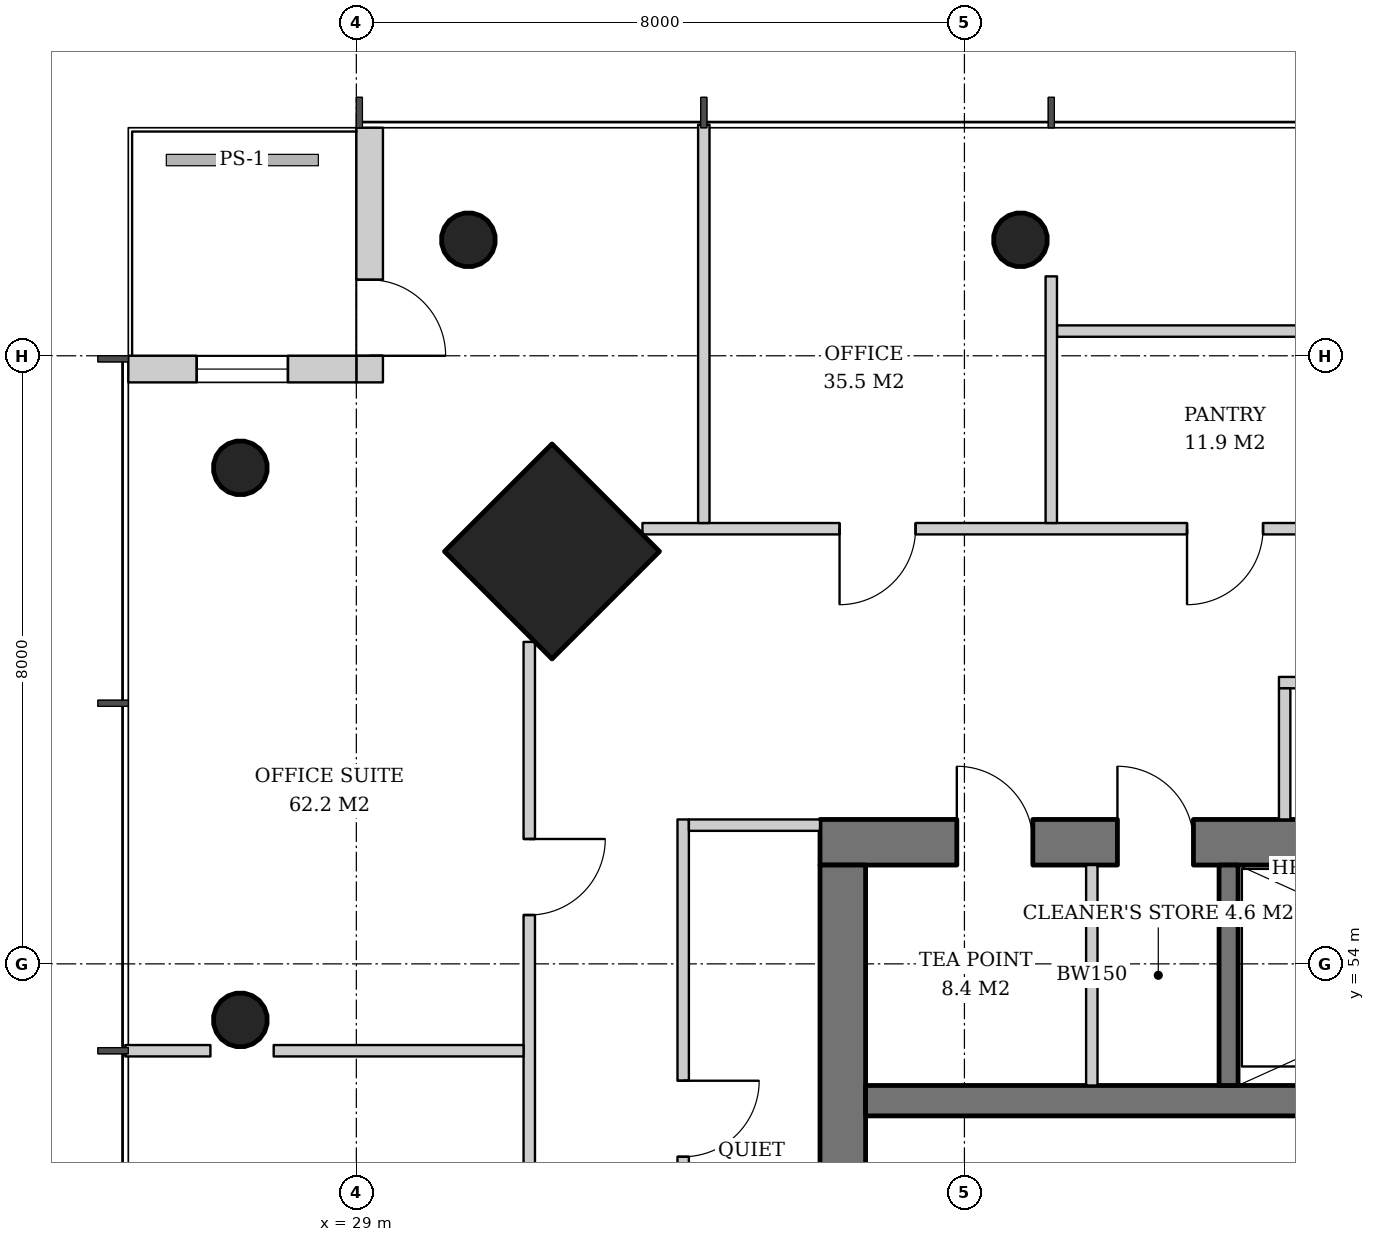
"""IFC4 building model, lengths in metres.
Left out: names, types, materials, properties, quantities, classifications, styles, units other than length and angle.
Written with IfcOpenShell. Run it as: python <this file> out.ifc"""

import sys

from ifc_helpers import new_model, si_unit, direction, frame, frame_2d, origin, origin_2d, place, context, subcontext, project, spatial, rectangle, hollow_circle, extrude, element, fill, save


model = new_model("IFC4")
c1 = context("Model", 3, precision=1e-05, world=origin(), true_north=direction((0.0, 1.0)))
c2 = subcontext(c1, "Body", "Model", "MODEL_VIEW")
j1 = project(units=[si_unit("LENGTHUNIT", "METRE"), si_unit("PLANEANGLEUNIT", "RADIAN")], contexts=[c1])
p1 = place(None, origin())
s1 = spatial("IfcSite", under=j1, at=p1, CompositionType="ELEMENT")
p2 = place(p1, origin())
s2 = spatial("IfcBuilding", under=s1, at=p2, CompositionType="ELEMENT")
p3 = place(p2, frame((0.0, 0.0, 222.4)))
s3 = spatial("IfcBuildingStorey", under=s2, at=p3, CompositionType="ELEMENT", Elevation=222.4)
p4 = place(p3, frame((31.536, 59.464, 0.0), z_axis=(0.031962158256, -0.031962158256, 0.998977898093), x_axis=(0.707106781187, 0.707106781187, 0.0)))
e1 = element("IfcColumn", 1, at=p4, inside=s3, PredefinedType="COLUMN", context=c2, shape_type="SweptSolid", body=[
    extrude(rectangle(XDim=2.0, YDim=2.0, at=origin_2d()), origin(), (0.0, 0.0, 1.0), 3.804),
])
p5 = place(p3, frame((30.436, 63.564, 0.0), z_axis=(0.031898107953, -0.031898107953, 0.998981992539), x_axis=(0.707106781187, 0.707106781187, 0.0)))
e2 = element("IfcColumn", 2, at=p5, inside=s3, PredefinedType="COLUMN", context=c2, shape_type="SweptSolid", body=[
    extrude(hollow_circle(Radius=0.355, WallThickness=0.025, at=origin_2d()), origin(), (0.0, 0.0, 1.0), 3.804),
])
p6 = place(p3, frame((37.718, 63.564, 0.0), z_axis=(0.015987237665, -0.031910269556, 0.999362868496), x_axis=(0.894067115991, 0.447933021895, 0.0)))
e3 = element("IfcColumn", 3, at=p6, inside=s3, PredefinedType="COLUMN", context=c2, shape_type="SweptSolid", body=[
    extrude(hollow_circle(Radius=0.355, WallThickness=0.025, at=origin_2d()), origin(), (0.0, 0.0, 1.0), 3.802),
])
p7 = place(p3, frame((27.436, 60.564, 0.0), z_axis=(0.031898107953, -0.031898107953, 0.998981992539), x_axis=(0.707106781187, 0.707106781187, 0.0)))
e4 = element("IfcColumn", 4, at=p7, inside=s3, PredefinedType="COLUMN", context=c2, shape_type="SweptSolid", body=[
    extrude(hollow_circle(Radius=0.355, WallThickness=0.025, at=origin_2d()), origin(), (0.0, 0.0, 1.0), 3.804),
])
p8 = place(p3, frame((27.436, 53.282, 0.0), z_axis=(0.031910269556, -0.015987237665, 0.999362868496), x_axis=(0.447933021895, 0.894067115991, 0.0)))
e5 = element("IfcColumn", 5, at=p8, inside=s3, PredefinedType="COLUMN", context=c2, shape_type="SweptSolid", body=[
    extrude(hollow_circle(Radius=0.355, WallThickness=0.025, at=origin_2d()), origin(), (0.0, 0.0, 1.0), 3.802),
])
p9 = place(p3, frame((35.1, 55.6, 0.0), z_axis=(0.0, 0.0, 1.0), x_axis=(1.0, 0.0, 0.0)))
e6 = element("IfcWall", 6, at=p9, inside=s3, PredefinedType="SHEAR", context=c2, shape_type="SweptSolid", body=[
    extrude(rectangle(XDim=19.8, YDim=0.6, at=frame_2d((9.9, 0.0))), origin(), (0.0, 0.0, 1.0), 3.8),
])
p10 = place(p9, frame((14.54, 0.0, 0.0)))
e7 = element("IfcOpeningElement", 7, at=p10, cuts=e6, PredefinedType="OPENING", context=c2, shape_type="SweptSolid", body=[
    extrude(rectangle(XDim=1.0, YDim=2.1, at=frame_2d((0.5, 1.05))), frame((0.0, 0.31, 0.0), z_axis=(0.0, -1.0, 0.0), x_axis=(1.0, 0.0, 0.0)), (0.0, 0.0, 1.0), 0.62),
])
p11 = place(p9, frame((1.8, 0.0, 0.0)))
e8 = element("IfcOpeningElement", 8, at=p11, cuts=e6, PredefinedType="OPENING", context=c2, shape_type="SweptSolid", body=[
    extrude(rectangle(XDim=1.0, YDim=2.1, at=frame_2d((0.5, 1.05))), frame((0.0, 0.31, 0.0), z_axis=(0.0, -1.0, 0.0), x_axis=(1.0, 0.0, 0.0)), (0.0, 0.0, 1.0), 0.62),
])
p12 = place(p9, frame((3.913, 0.0, 0.0)))
e9 = element("IfcOpeningElement", 9, at=p12, cuts=e6, PredefinedType="OPENING", context=c2, shape_type="SweptSolid", body=[
    extrude(rectangle(XDim=1.0, YDim=2.1, at=frame_2d((0.5, 1.05))), frame((0.0, 0.31, 0.0), z_axis=(0.0, -1.0, 0.0), x_axis=(1.0, 0.0, 0.0)), (0.0, 0.0, 1.0), 0.62),
])
p13 = place(p3, frame((35.4, 36.7, 0.0), z_axis=(0.0, 0.0, 1.0), x_axis=(0.0, 1.0, 0.0)))
e10 = element("IfcWall", 10, at=p13, inside=s3, PredefinedType="SHEAR", context=c2, shape_type="SweptSolid", body=[
    extrude(rectangle(XDim=18.6, YDim=0.6, at=frame_2d((9.3, 0.0))), origin(), (0.0, 0.0, 1.0), 3.8),
])
p14 = place(p13, frame((8.4, 0.0, 0.0)))
e11 = element("IfcOpeningElement", 11, at=p14, cuts=e10, PredefinedType="OPENING", context=c2, shape_type="SweptSolid", body=[
    extrude(rectangle(XDim=1.8, YDim=2.4, at=frame_2d((0.9, 1.2))), frame((0.0, 0.31, 0.0), z_axis=(0.0, -1.0, 0.0), x_axis=(1.0, 0.0, 0.0)), (0.0, 0.0, 1.0), 0.62),
])
p15 = place(p3, frame((35.7, 52.2, 0.0), z_axis=(0.0, 0.0, 1.0), x_axis=(1.0, 0.0, 0.0)))
e12 = element("IfcWall", 12, at=p15, inside=s3, PredefinedType="SHEAR", context=c2, shape_type="SweptSolid", body=[
    extrude(rectangle(XDim=18.6, YDim=0.4, at=frame_2d((9.3, 0.0))), origin(), (0.0, 0.0, 1.0), 3.8),
])
p16 = place(p3, frame((29.175, 65.0, 0.0), z_axis=(0.0, 0.0, 1.0), x_axis=(0.0, -1.0, 0.0)))
e13 = element("IfcWall", 13, at=p16, inside=s3, PredefinedType="SOLIDWALL", context=c2, shape_type="SweptSolid", body=[
    extrude(rectangle(XDim=3.35, YDim=0.35, at=frame_2d((1.675, 0.0))), origin(), (0.0, 0.0, 1.0), 3.52),
])
p17 = place(p16, frame((2.0, 0.0, 0.0)))
e14 = element("IfcOpeningElement", 14, at=p17, cuts=e13, PredefinedType="OPENING", context=c2, shape_type="SweptSolid", body=[
    extrude(rectangle(XDim=1.0, YDim=2.4, at=frame_2d((0.5, 1.2))), frame((0.0, 0.185, 0.0), z_axis=(0.0, -1.0, 0.0), x_axis=(1.0, 0.0, 0.0)), (0.0, 0.0, 1.0), 0.37),
])
p18 = place(p3, frame((29.0, 61.825, 0.0), z_axis=(0.0, 0.0, 1.0), x_axis=(-1.0, 0.0, 0.0)))
e15 = element("IfcWall", 15, at=p18, inside=s3, PredefinedType="SOLIDWALL", context=c2, shape_type="SweptSolid", body=[
    extrude(rectangle(XDim=3.0, YDim=0.35, at=frame_2d((1.5, 0.0))), origin(), (0.0, 0.0, 1.0), 3.52),
])
p19 = place(p18, frame((0.9, 0.0, 0.6)))
e16 = element("IfcOpeningElement", 16, at=p19, cuts=e15, PredefinedType="OPENING", context=c2, shape_type="SweptSolid", body=[
    extrude(rectangle(XDim=1.2, YDim=2.55, at=frame_2d((0.6, 1.275))), frame((0.0, 0.185, 0.0), z_axis=(0.0, -1.0, 0.0), x_axis=(1.0, 0.0, 0.0)), (0.0, 0.0, 1.0), 0.37),
])
p20 = place(p3, frame((40.475, 52.4, 0.0), z_axis=(0.0, 0.0, 1.0), x_axis=(0.0, 1.0, 0.0)))
e17 = element("IfcWall", 17, at=p20, inside=s3, PredefinedType="SHEAR", context=c2, shape_type="SweptSolid", body=[
    extrude(rectangle(XDim=2.9, YDim=0.25, at=frame_2d((1.45, 0.0))), origin(), (0.0, 0.0, 1.0), 3.8),
])
p21 = place(p3, frame((38.676, 52.4, 0.0), z_axis=(0.0, 0.0, 1.0), x_axis=(0.0, 1.0, 0.0)))
e18 = element("IfcWall", 18, at=p21, inside=s3, PredefinedType="SOLIDWALL", context=c2, shape_type="SweptSolid", body=[
    extrude(rectangle(XDim=2.9, YDim=0.15, at=frame_2d((1.45, 0.0))), origin(), (0.0, 0.0, 1.0), 3.52),
])
p22 = place(p3, frame((48.515, 57.7, 0.0), z_axis=(0.0, 0.0, 1.0), x_axis=(-1.0, 0.0, 0.0)))
e19 = element("IfcWall", 19, at=p22, inside=s3, PredefinedType="PARTITIONING", context=c2, shape_type="SweptSolid", body=[
    extrude(rectangle(XDim=7.377, YDim=0.15, at=frame_2d((3.688, 0.0))), origin(), (0.0, 0.0, 1.0), 2.706),
])
p23 = place(p22, frame((3.188, 0.0, 0.0)))
e20 = element("IfcOpeningElement", 20, at=p23, cuts=e19, PredefinedType="OPENING", context=c2, shape_type="SweptSolid", body=[
    extrude(rectangle(XDim=1.0, YDim=2.1, at=frame_2d((0.5, 1.05))), frame((0.0, 0.085, 0.0), z_axis=(0.0, -1.0, 0.0), x_axis=(1.0, 0.0, 0.0)), (0.0, 0.0, 1.0), 0.17),
])
p24 = place(p3, frame((41.213, 55.9, 0.0), z_axis=(0.0, 0.0, 1.0), x_axis=(0.0, 1.0, 0.0)))
e21 = element("IfcWall", 21, at=p24, inside=s3, PredefinedType="PARTITIONING", context=c2, shape_type="SweptSolid", body=[
    extrude(rectangle(XDim=1.725, YDim=0.15, at=frame_2d((0.863, 0.0))), origin(), (0.0, 0.0, 1.0), 2.706),
])
p25 = place(p3, frame((33.3, 55.9, 0.0), z_axis=(0.0, 0.0, 1.0), x_axis=(0.0, -1.0, 0.0)))
e22 = element("IfcWall", 22, at=p25, inside=s3, PredefinedType="PARTITIONING", context=c2, shape_type="SweptSolid", body=[
    extrude(rectangle(XDim=7.875, YDim=0.15, at=frame_2d((3.938, 0.0))), origin(), (0.0, 0.0, 1.0), 2.706),
])
p26 = place(p25, frame((3.438, 0.0, 0.0)))
e23 = element("IfcOpeningElement", 23, at=p26, cuts=e22, PredefinedType="OPENING", context=c2, shape_type="SweptSolid", body=[
    extrude(rectangle(XDim=1.0, YDim=2.1, at=frame_2d((0.5, 1.05))), frame((0.0, 0.085, 0.0), z_axis=(0.0, -1.0, 0.0), x_axis=(1.0, 0.0, 0.0)), (0.0, 0.0, 1.0), 0.17),
])
p27 = place(p3, frame((35.1, 55.825, 0.0), z_axis=(0.0, 0.0, 1.0), x_axis=(-1.0, 0.0, 0.0)))
e24 = element("IfcWall", 24, at=p27, inside=s3, PredefinedType="PARTITIONING", context=c2, shape_type="SweptSolid", body=[
    extrude(rectangle(XDim=1.725, YDim=0.15, at=frame_2d((0.863, 0.0))), origin(), (0.0, 0.0, 1.0), 2.92),
])
p28 = place(p3, frame((42.639, 62.325, 0.0), z_axis=(0.0, 0.0, 1.0), x_axis=(-1.0, 0.0, 0.0)))
e25 = element("IfcWall", 25, at=p28, inside=s3, PredefinedType="PARTITIONING", context=c2, shape_type="SweptSolid", body=[
    extrude(rectangle(XDim=4.422, YDim=0.15, at=frame_2d((2.211, 0.0))), origin(), (0.0, 0.0, 1.0), 2.706),
])
p29 = place(p3, frame((57.236, 59.725, 0.0), z_axis=(0.0, 0.0, 1.0), x_axis=(-1.0, 0.0, 0.0)))
e26 = element("IfcWall", 26, at=p29, inside=s3, PredefinedType="PARTITIONING", context=c2, shape_type="SweptSolid", body=[
    extrude(rectangle(XDim=24.472, YDim=0.15, at=frame_2d((12.236, 0.0))), origin(), (0.0, 0.0, 1.0), 2.706),
])
p30 = place(p29, frame((2.593, 0.0, 0.0)))
e27 = element("IfcOpeningElement", 27, at=p30, cuts=e26, PredefinedType="OPENING", context=c2, shape_type="SweptSolid", body=[
    extrude(rectangle(XDim=1.0, YDim=2.1, at=frame_2d((0.5, 1.05))), frame((0.0, 0.085, 0.0), z_axis=(0.0, -1.0, 0.0), x_axis=(1.0, 0.0, 0.0)), (0.0, 0.0, 1.0), 0.17),
])
p31 = place(p29, frame((7.164, 0.0, 0.0)))
e28 = element("IfcOpeningElement", 28, at=p31, cuts=e26, PredefinedType="OPENING", context=c2, shape_type="SweptSolid", body=[
    extrude(rectangle(XDim=1.0, YDim=2.1, at=frame_2d((0.5, 1.05))), frame((0.0, 0.085, 0.0), z_axis=(0.0, -1.0, 0.0), x_axis=(1.0, 0.0, 0.0)), (0.0, 0.0, 1.0), 0.17),
])
p32 = place(p29, frame((11.736, 0.0, 0.0)))
e29 = element("IfcOpeningElement", 29, at=p32, cuts=e26, PredefinedType="OPENING", context=c2, shape_type="SweptSolid", body=[
    extrude(rectangle(XDim=1.0, YDim=2.1, at=frame_2d((0.5, 1.05))), frame((0.0, 0.085, 0.0), z_axis=(0.0, -1.0, 0.0), x_axis=(1.0, 0.0, 0.0)), (0.0, 0.0, 1.0), 0.17),
])
p33 = place(p29, frame((16.307, 0.0, 0.0)))
e30 = element("IfcOpeningElement", 30, at=p33, cuts=e26, PredefinedType="OPENING", context=c2, shape_type="SweptSolid", body=[
    extrude(rectangle(XDim=1.0, YDim=2.1, at=frame_2d((0.5, 1.05))), frame((0.0, 0.085, 0.0), z_axis=(0.0, -1.0, 0.0), x_axis=(1.0, 0.0, 0.0)), (0.0, 0.0, 1.0), 0.17),
])
p34 = place(p29, frame((20.879, 0.0, 0.0)))
e31 = element("IfcOpeningElement", 31, at=p34, cuts=e26, PredefinedType="OPENING", context=c2, shape_type="SweptSolid", body=[
    extrude(rectangle(XDim=1.0, YDim=2.1, at=frame_2d((0.5, 1.05))), frame((0.0, 0.085, 0.0), z_axis=(0.0, -1.0, 0.0), x_axis=(1.0, 0.0, 0.0)), (0.0, 0.0, 1.0), 0.17),
])
p35 = place(p3, frame((38.143, 59.8, 0.0), z_axis=(0.0, 0.0, 1.0), x_axis=(0.0, 1.0, 0.0)))
e32 = element("IfcWall", 32, at=p35, inside=s3, PredefinedType="PARTITIONING", context=c2, shape_type="SweptSolid", body=[
    extrude(rectangle(XDim=3.245, YDim=0.15, at=frame_2d((1.623, 0.0))), origin(), (0.0, 0.0, 1.0), 3.52),
])
p36 = place(p3, frame((33.572, 59.8, 0.0), z_axis=(0.0, 0.0, 1.0), x_axis=(0.0, 1.0, 0.0)))
e33 = element("IfcWall", 33, at=p36, inside=s3, PredefinedType="PARTITIONING", context=c2, shape_type="SweptSolid", body=[
    extrude(rectangle(XDim=5.24, YDim=0.15, at=frame_2d((2.62, 0.0))), origin(), (0.0, 0.0, 1.0), 3.52),
])
p37 = place(p3, frame((31.275, 58.236, 0.0), z_axis=(0.0, 0.0, 1.0), x_axis=(0.0, -1.0, 0.0)))
e34 = element("IfcWall", 34, at=p37, inside=s3, PredefinedType="PARTITIONING", context=c2, shape_type="SweptSolid", body=[
    extrude(rectangle(XDim=24.472, YDim=0.15, at=frame_2d((12.236, 0.0))), origin(), (0.0, 0.0, 1.0), 2.706),
])
p38 = place(p37, frame((2.593, 0.0, 0.0)))
e35 = element("IfcOpeningElement", 35, at=p38, cuts=e34, PredefinedType="OPENING", context=c2, shape_type="SweptSolid", body=[
    extrude(rectangle(XDim=1.0, YDim=2.1, at=frame_2d((0.5, 1.05))), frame((0.0, 0.085, 0.0), z_axis=(0.0, -1.0, 0.0), x_axis=(1.0, 0.0, 0.0)), (0.0, 0.0, 1.0), 0.17),
])
p39 = place(p37, frame((7.164, 0.0, 0.0)))
e36 = element("IfcOpeningElement", 36, at=p39, cuts=e34, PredefinedType="OPENING", context=c2, shape_type="SweptSolid", body=[
    extrude(rectangle(XDim=1.0, YDim=2.1, at=frame_2d((0.5, 1.05))), frame((0.0, 0.085, 0.0), z_axis=(0.0, -1.0, 0.0), x_axis=(1.0, 0.0, 0.0)), (0.0, 0.0, 1.0), 0.17),
])
p40 = place(p37, frame((11.836, 0.0, 0.0)))
e37 = element("IfcOpeningElement", 37, at=p40, cuts=e34, PredefinedType="OPENING", context=c2, shape_type="SweptSolid", body=[
    extrude(rectangle(XDim=0.8, YDim=2.1, at=frame_2d((0.4, 1.05))), frame((0.0, 0.085, 0.0), z_axis=(0.0, -1.0, 0.0), x_axis=(1.0, 0.0, 0.0)), (0.0, 0.0, 1.0), 0.17),
])
p41 = place(p37, frame((16.307, 0.0, 0.0)))
e38 = element("IfcOpeningElement", 38, at=p41, cuts=e34, PredefinedType="OPENING", context=c2, shape_type="SweptSolid", body=[
    extrude(rectangle(XDim=1.0, YDim=2.1, at=frame_2d((0.5, 1.05))), frame((0.0, 0.085, 0.0), z_axis=(0.0, -1.0, 0.0), x_axis=(1.0, 0.0, 0.0)), (0.0, 0.0, 1.0), 0.17),
])
p42 = place(p37, frame((20.979, 0.0, 0.0)))
e39 = element("IfcOpeningElement", 39, at=p42, cuts=e34, PredefinedType="OPENING", context=c2, shape_type="SweptSolid", body=[
    extrude(rectangle(XDim=0.8, YDim=2.1, at=frame_2d((0.4, 1.05))), frame((0.0, 0.085, 0.0), z_axis=(0.0, -1.0, 0.0), x_axis=(1.0, 0.0, 0.0)), (0.0, 0.0, 1.0), 0.17),
])
p43 = place(p3, frame((31.2, 52.857, 0.0), z_axis=(0.0, 0.0, 1.0), x_axis=(-1.0, 0.0, 0.0)))
e40 = element("IfcWall", 40, at=p43, inside=s3, PredefinedType="PARTITIONING", context=c2, shape_type="SweptSolid", body=[
    extrude(rectangle(XDim=3.287, YDim=0.15, at=frame_2d((1.644, 0.0))), origin(), (0.0, 0.0, 1.0), 3.52),
])
p44 = place(p3, frame((27.08, 52.857, 0.0), z_axis=(0.0, 0.0, 1.0), x_axis=(-1.0, 0.0, 0.0)))
e41 = element("IfcWall", 41, at=p44, inside=s3, PredefinedType="PARTITIONING", context=c2, shape_type="SweptSolid", body=[
    extrude(rectangle(XDim=1.12, YDim=0.15, at=frame_2d((0.56, 0.0))), origin(), (0.0, 0.0, 1.0), 3.52),
])
p45 = place(p17, origin())
e42 = element("IfcDoor", 42, at=p45, inside=s3, OperationType="SINGLE_SWING_RIGHT", PredefinedType="DOOR", context=c2, shape_type="SweptSolid", body=[
    extrude(rectangle(XDim=1.0, YDim=2.4, at=frame_2d((0.5, 1.2))), frame((0.0, 0.025, 0.0), z_axis=(0.0, -1.0, 0.0), x_axis=(1.0, 0.0, 0.0)), (0.0, 0.0, 1.0), 0.05),
])
fill(e14, e42)
p46 = place(p19, origin())
e43 = element("IfcWindow", 43, at=p46, inside=s3, PartitioningType="SINGLE_PANEL", PredefinedType="WINDOW", context=c2, shape_type="SweptSolid", body=[
    extrude(rectangle(XDim=1.2, YDim=2.55, at=frame_2d((0.6, 1.275))), frame((0.0, 0.03, 0.0), z_axis=(0.0, -1.0, 0.0), x_axis=(1.0, 0.0, 0.0)), (0.0, 0.0, 1.0), 0.06),
])
fill(e16, e43)
p47 = place(p11, origin())
e44 = element("IfcDoor", 44, at=p47, inside=s3, OperationType="SINGLE_SWING_LEFT", PredefinedType="DOOR", context=c2, shape_type="SweptSolid", body=[
    extrude(rectangle(XDim=1.0, YDim=2.1, at=frame_2d((0.5, 1.05))), frame((0.0, -0.24, 0.0), z_axis=(0.0, -1.0, 0.0), x_axis=(1.0, 0.0, 0.0)), (0.0, 0.0, 1.0), 0.05),
])
fill(e8, e44)
p48 = place(p12, origin())
e45 = element("IfcDoor", 45, at=p48, inside=s3, OperationType="SINGLE_SWING_LEFT", PredefinedType="DOOR", context=c2, shape_type="SweptSolid", body=[
    extrude(rectangle(XDim=1.0, YDim=2.1, at=frame_2d((0.5, 1.05))), frame((0.0, -0.24, 0.0), z_axis=(0.0, -1.0, 0.0), x_axis=(1.0, 0.0, 0.0)), (0.0, 0.0, 1.0), 0.05),
])
fill(e9, e45)
p49 = place(p26, origin())
e46 = element("IfcDoor", 46, at=p49, inside=s3, OperationType="SINGLE_SWING_LEFT", PredefinedType="DOOR", context=c2, shape_type="SweptSolid", body=[
    extrude(rectangle(XDim=1.0, YDim=2.1, at=frame_2d((0.5, 1.05))), frame((0.0, 0.025, 0.0), z_axis=(0.0, -1.0, 0.0), x_axis=(1.0, 0.0, 0.0)), (0.0, 0.0, 1.0), 0.05),
])
fill(e23, e46)
p50 = place(p33, origin())
e47 = element("IfcDoor", 47, at=p50, inside=s3, OperationType="SINGLE_SWING_RIGHT", PredefinedType="DOOR", context=c2, shape_type="SweptSolid", body=[
    extrude(rectangle(XDim=1.0, YDim=2.1, at=frame_2d((0.5, 1.05))), frame((0.0, 0.025, 0.0), z_axis=(0.0, -1.0, 0.0), x_axis=(1.0, 0.0, 0.0)), (0.0, 0.0, 1.0), 0.05),
])
fill(e30, e47)
p51 = place(p34, origin())
e48 = element("IfcDoor", 48, at=p51, inside=s3, OperationType="SINGLE_SWING_RIGHT", PredefinedType="DOOR", context=c2, shape_type="SweptSolid", body=[
    extrude(rectangle(XDim=1.0, YDim=2.1, at=frame_2d((0.5, 1.05))), frame((0.0, 0.025, 0.0), z_axis=(0.0, -1.0, 0.0), x_axis=(1.0, 0.0, 0.0)), (0.0, 0.0, 1.0), 0.05),
])
fill(e31, e48)
p52 = place(p38, origin())
e49 = element("IfcDoor", 49, at=p52, inside=s3, OperationType="SINGLE_SWING_LEFT", PredefinedType="DOOR", context=c2, shape_type="SweptSolid", body=[
    extrude(rectangle(XDim=1.0, YDim=2.1, at=frame_2d((0.5, 1.05))), frame((0.0, 0.025, 0.0), z_axis=(0.0, -1.0, 0.0), x_axis=(1.0, 0.0, 0.0)), (0.0, 0.0, 1.0), 0.05),
])
fill(e35, e49)
save(model, sys.argv[1])
